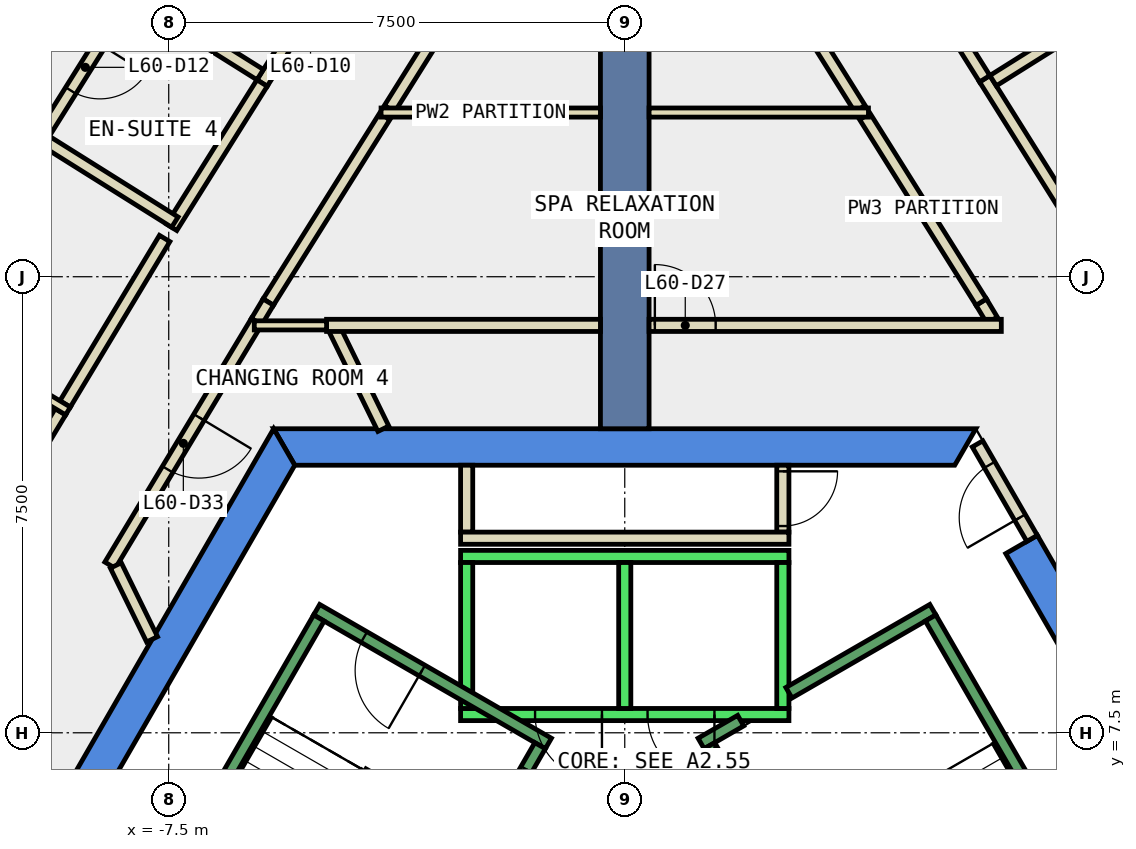
"""IFC4 building model, lengths in metres.
Left out: names, types, materials, properties, quantities, classifications, styles, units other than length and angle.
Written with IfcOpenShell. Run it as: python <this file> out.ifc"""

import sys

from ifc_helpers import new_model, si_unit, direction, frame, frame_2d, origin, place, context, subcontext, project, spatial, polyline, rectangle, outline, extrude, element, fill, save


model = new_model("IFC4")
c1 = context("Model", 3, precision=1e-05, world=origin(), true_north=direction((0.0, 1.0)))
c2 = subcontext(c1, "Body", "Model", "MODEL_VIEW")
j1 = project(units=[si_unit("LENGTHUNIT", "METRE"), si_unit("PLANEANGLEUNIT", "RADIAN")], contexts=[c1])
p1 = place(None, origin())
s1 = spatial("IfcSite", under=j1, at=p1, CompositionType="ELEMENT")
p2 = place(p1, origin())
s2 = spatial("IfcBuilding", under=s1, at=p2, CompositionType="ELEMENT")
p3 = place(p2, frame((0.0, 0.0, 263.0)))
s3 = spatial("IfcBuildingStorey", under=s2, at=p3, CompositionType="ELEMENT", Elevation=263.0)
p4 = place(p3, frame((0.0, 0.0, -0.34)))
e1 = element("IfcWall", 1, at=p4, inside=s3, PredefinedType="SHEAR", context=c2, shape_type="SweptSolid", body=[
    extrude(outline(polyline([(6.786, 10.747), (6.266, 10.447), (10.854, 2.5), (11.547, 2.5), (6.786, 10.747)])), origin(), (0.0, 0.0, 1.0), 3.6),
])
p5 = place(p3, frame((0.0, 0.0, -0.34)))
e2 = element("IfcWall", 2, at=p5, inside=s3, PredefinedType="SHEAR", context=c2, shape_type="SweptSolid", body=[
    extrude(outline(polyline([(5.774, 12.5), (-5.774, 12.5), (-5.427, 11.9), (5.427, 11.9), (5.774, 12.5)])), origin(), (0.0, 0.0, 1.0), 3.6),
])
p6 = place(p3, frame((0.0, 0.0, -0.34)))
e3 = element("IfcWall", 3, at=p6, inside=s3, PredefinedType="SHEAR", context=c2, shape_type="SweptSolid", body=[
    extrude(outline(polyline([(-10.535, 4.253), (-10.015, 3.953), (-5.427, 11.9), (-5.774, 12.5), (-10.535, 4.253)])), origin(), (0.0, 0.0, 1.0), 3.6),
])
p7 = place(p3, frame((0.0, 12.5, -0.34), z_axis=(0.0, 0.0, 1.0), x_axis=(0.0, 1.0, 0.0)))
e4 = element("IfcWall", 4, at=p7, inside=s3, PredefinedType="SHEAR", context=c2, shape_type="SweptSolid", body=[
    extrude(rectangle(XDim=9.0, YDim=0.8, at=frame_2d((4.5, 0.0))), origin(), (0.0, 0.0, 1.0), 3.6),
])
p8 = place(p3, frame((-3.97, 12.5, 0.0), z_axis=(0.0, 0.0, 1.0), x_axis=(-0.440355460167, 0.89782351757, 0.0)))
e5 = element("IfcWall", 5, at=p8, inside=s3, PredefinedType="PARTITIONING", context=c2, shape_type="SweptSolid", body=[
    extrude(rectangle(XDim=1.869, YDim=0.2, at=frame_2d((0.935, 0.0))), origin(), (0.0, 0.0, 1.0), 3.26),
])
p9 = place(p3, frame((-6.054, 14.264, 0.0), z_axis=(0.0, 0.0, 1.0), x_axis=(-0.515508653897, -0.856884372455, 0.0)))
e6 = element("IfcWall", 6, at=p9, inside=s3, PredefinedType="PARTITIONING", context=c2, shape_type="SweptSolid", body=[
    extrude(rectangle(XDim=4.677, YDim=0.2, at=frame_2d((2.339, 0.0))), origin(), (0.0, 0.0, 1.0), 3.26),
])
p10 = place(p9, frame((1.839, 0.0, 0.0)))
e7 = element("IfcOpeningElement", 7, at=p10, cuts=e6, PredefinedType="OPENING", context=c2, shape_type="SweptSolid", body=[
    extrude(rectangle(XDim=1.0, YDim=2.1, at=frame_2d((0.5, 1.05))), frame((0.0, 0.11, 0.0), z_axis=(0.0, -1.0, 0.0), x_axis=(1.0, 0.0, 0.0)), (0.0, 0.0, 1.0), 0.22),
])
p11 = place(p3, frame((-8.37, 10.252, 0.0), z_axis=(0.0, 0.0, 1.0), x_axis=(0.440562172885, -0.897722101668, 0.0)))
e8 = element("IfcWall", 8, at=p11, inside=s3, PredefinedType="PARTITIONING", context=c2, shape_type="SweptSolid", body=[
    extrude(rectangle(XDim=1.353, YDim=0.2, at=frame_2d((0.677, 0.0))), origin(), (0.0, 0.0, 1.0), 3.26),
])
p12 = place(p3, frame((-4.904, 14.2, 0.0), z_axis=(0.0, 0.0, 1.0), x_axis=(1.0, 0.0, 0.0)))
e9 = element("IfcWall", 9, at=p12, inside=s3, PredefinedType="PARTITIONING", context=c2, shape_type="SweptSolid", body=[
    extrude(rectangle(XDim=4.504, YDim=0.2, at=frame_2d((2.252, 0.0))), origin(), (0.0, 0.0, 1.0), 3.26),
])
p13 = place(p3, frame((6.041, 14.286, 0.0), z_axis=(0.0, 0.0, 1.0), x_axis=(-0.513873647624, 0.857865883619, 0.0)))
e10 = element("IfcWall", 10, at=p13, inside=s3, PredefinedType="PARTITIONING", context=c2, shape_type="SweptSolid", body=[
    extrude(rectangle(XDim=0.346, YDim=0.2, at=frame_2d((0.173, 0.0))), origin(), (0.0, 0.0, 1.0), 3.26),
])
for number, where, z_axis, x_axis in (
    (11, (5.863, 14.583, 0.0), (0.0, 0.0, 1.0), (-0.531, 0.847, 0.0)),
    (12, (-3.948, 17.636, 0.0), (0.0, 0.0, 1.0), (-0.531, -0.847, 0.0)),
):
    element("IfcWall", number, at=place(p3, frame(where, z_axis=z_axis, x_axis=x_axis)), inside=s3, PredefinedType="PARTITIONING", context=c2, shape_type="SweptSolid", body=[
        extrude(rectangle(XDim=3.604, YDim=0.2, at=frame_2d((1.802, 0.0))), origin(), (0.0, 0.0, 1.0), 3.26),
    ])
p14 = place(p3, frame((-5.863, 14.583, 0.0), z_axis=(0.0, 0.0, 1.0), x_axis=(-0.513433271491, -0.858129521533, 0.0)))
e13 = element("IfcWall", 13, at=p14, inside=s3, PredefinedType="PARTITIONING", context=c2, shape_type="SweptSolid", body=[
    extrude(rectangle(XDim=0.372, YDim=0.2, at=frame_2d((0.186, 0.0))), origin(), (0.0, 0.0, 1.0), 3.26),
])
for number, where, z_axis, x_axis in (
    (14, (3.868, 17.764, 0.0), (0.0, 0.0, 1.0), (-0.531, 0.847, 0.0)),
    (15, (-2.773, 19.511, 0.0), (0.0, 0.0, 1.0), (-0.531, -0.847, 0.0)),
):
    element("IfcWall", number, at=place(p3, frame(where, z_axis=z_axis, x_axis=x_axis)), inside=s3, PredefinedType="PARTITIONING", context=c2, shape_type="SweptSolid", body=[
        extrude(rectangle(XDim=2.062, YDim=0.2, at=frame_2d((1.031, 0.0))), origin(), (0.0, 0.0, 1.0), 3.26),
    ])
p15 = place(p3, frame((5.92, 18.256, 0.0), z_axis=(0.0, 0.0, 1.0), x_axis=(0.531152062518, -0.84727651123, 0.0)))
e16 = element("IfcWall", 16, at=p15, inside=s3, PredefinedType="PARTITIONING", context=c2, shape_type="SweptSolid", body=[
    extrude(rectangle(XDim=3.101, YDim=0.2, at=frame_2d((1.55, 0.0))), origin(), (0.0, 0.0, 1.0), 3.26),
])
p16 = place(p3, frame((4.433, 20.628, 0.0), z_axis=(0.0, 0.0, 1.0), x_axis=(0.531135189756, -0.84728708842, 0.0)))
e17 = element("IfcWall", 17, at=p16, inside=s3, PredefinedType="PARTITIONING", context=c2, shape_type="SweptSolid", body=[
    extrude(rectangle(XDim=2.799, YDim=0.2, at=frame_2d((1.4, 0.0))), origin(), (0.0, 0.0, 1.0), 3.26),
])
p17 = place(p3, frame((-5.965, 18.185, 0.0), z_axis=(0.0, 0.0, 1.0), x_axis=(0.531256372055, 0.847211111324, 0.0)))
e18 = element("IfcWall", 18, at=p17, inside=s3, PredefinedType="PARTITIONING", context=c2, shape_type="SweptSolid", body=[
    extrude(rectangle(XDim=3.0, YDim=0.2, at=frame_2d((1.5, 0.0))), origin(), (0.0, 0.0, 1.0), 3.26),
])
p18 = place(p17, frame((1.0, 0.0, 0.0)))
e19 = element("IfcOpeningElement", 19, at=p18, cuts=e18, PredefinedType="OPENING", context=c2, shape_type="SweptSolid", body=[
    extrude(rectangle(XDim=1.0, YDim=2.1, at=frame_2d((0.5, 1.05))), frame((0.0, 0.11, 0.0), z_axis=(0.0, -1.0, 0.0), x_axis=(1.0, 0.0, 0.0)), (0.0, 0.0, 1.0), 0.22),
])
p19 = place(p3, frame((-9.204, 12.908, 0.0), z_axis=(0.0, 0.0, 1.0), x_axis=(0.51556943596, 0.856847802532, 0.0)))
e20 = element("IfcWall", 20, at=p19, inside=s3, PredefinedType="PARTITIONING", context=c2, shape_type="SweptSolid", body=[
    extrude(rectangle(XDim=3.176, YDim=0.2, at=frame_2d((1.588, 0.0))), origin(), (0.0, 0.0, 1.0), 3.26),
])
p20 = place(p3, frame((-7.452, 15.813, 0.0), z_axis=(0.0, 0.0, 1.0), x_axis=(0.531095943551, 0.847311689252, 0.0)))
e21 = element("IfcWall", 21, at=p20, inside=s3, PredefinedType="PARTITIONING", context=c2, shape_type="SweptSolid", body=[
    extrude(rectangle(XDim=2.8, YDim=0.2, at=frame_2d((1.4, 0.0))), origin(), (0.0, 0.0, 1.0), 3.26),
])
p21 = place(p3, frame((-10.919, 10.057, 0.0), z_axis=(0.0, 0.0, 1.0), x_axis=(0.515568955032, 0.856848091908, 0.0)))
e22 = element("IfcWall", 22, at=p21, inside=s3, PredefinedType="PARTITIONING", context=c2, shape_type="SweptSolid", body=[
    extrude(rectangle(XDim=3.177, YDim=0.2, at=frame_2d((1.588, 0.0))), origin(), (0.0, 0.0, 1.0), 3.26),
])
p22 = place(p21, frame((1.088, 0.0, 0.0)))
e23 = element("IfcOpeningElement", 23, at=p22, cuts=e22, PredefinedType="OPENING", context=c2, shape_type="SweptSolid", body=[
    extrude(rectangle(XDim=1.0, YDim=2.1, at=frame_2d((0.5, 1.05))), frame((0.0, 0.11, 0.0), z_axis=(0.0, -1.0, 0.0), x_axis=(1.0, 0.0, 0.0)), (0.0, 0.0, 1.0), 0.22),
])
p23 = place(p3, frame((-2.6, 10.8, 0.0), z_axis=(0.0, 0.0, 1.0), x_axis=(0.0, 1.0, 0.0)))
e24 = element("IfcWall", 24, at=p23, inside=s3, PredefinedType="PARTITIONING", context=c2, shape_type="SweptSolid", body=[
    extrude(rectangle(XDim=1.1, YDim=0.2, at=frame_2d((0.55, 0.0))), origin(), (0.0, 0.0, 1.0), 3.26),
])
p24 = place(p3, frame((2.6, 11.9, 0.0), z_axis=(0.0, 0.0, 1.0), x_axis=(0.0, -1.0, 0.0)))
e25 = element("IfcWall", 25, at=p24, inside=s3, PredefinedType="PARTITIONING", context=c2, shape_type="SweptSolid", body=[
    extrude(rectangle(XDim=1.1, YDim=0.2, at=frame_2d((0.55, 0.0))), origin(), (0.0, 0.0, 1.0), 3.26),
])
p25 = place(p24, frame((0.1, 0.0, 0.0)))
e26 = element("IfcOpeningElement", 26, at=p25, cuts=e25, PredefinedType="OPENING", context=c2, shape_type="SweptSolid", body=[
    extrude(rectangle(XDim=0.9, YDim=2.1, at=frame_2d((0.45, 1.05))), frame((0.0, 0.11, 0.0), z_axis=(0.0, -1.0, 0.0), x_axis=(1.0, 0.0, 0.0)), (0.0, 0.0, 1.0), 0.22),
])
p26 = place(p3, frame((2.7, 10.7, 0.0), z_axis=(0.0, 0.0, 1.0), x_axis=(-1.0, 0.0, 0.0)))
e27 = element("IfcWall", 27, at=p26, inside=s3, PredefinedType="PARTITIONING", context=c2, shape_type="SweptSolid", body=[
    extrude(rectangle(XDim=5.4, YDim=0.2, at=frame_2d((2.7, 0.0))), origin(), (0.0, 0.0, 1.0), 3.26),
])
p27 = place(p3, frame((-4.904, 14.2, 0.0), z_axis=(0.0, 0.0, 1.0), x_axis=(-1.0, 0.0, 0.0)))
e28 = element("IfcWall", 28, at=p27, inside=s3, PredefinedType="PARTITIONING", context=c2, shape_type="SweptSolid", body=[
    extrude(rectangle(XDim=1.189, YDim=0.15, at=frame_2d((0.594, 0.0))), origin(), (0.0, 0.0, 1.0), 3.26),
])
p28 = place(p3, frame((-4.008, 17.7, 0.0), z_axis=(0.0, 0.0, 1.0), x_axis=(1.0, 0.0, 0.0)))
e29 = element("IfcWall", 29, at=p28, inside=s3, PredefinedType="PARTITIONING", context=c2, shape_type="SweptSolid", body=[
    extrude(rectangle(XDim=3.608, YDim=0.15, at=frame_2d((1.804, 0.0))), origin(), (0.0, 0.0, 1.0), 3.26),
])
for number, where, z_axis, x_axis in (
    (30, (6.058, 18.224, 0.0), (0.0, 0.0, 1.0), (0.847, 0.531, 0.0)),
    (31, (-5.996, 18.323, 0.0), (0.0, 0.0, 1.0), (-0.847, 0.531, 0.0)),
):
    element("IfcWall", number, at=place(p3, frame(where, z_axis=z_axis, x_axis=x_axis)), inside=s3, PredefinedType="PARTITIONING", context=c2, shape_type="SweptSolid", body=[
        extrude(rectangle(XDim=2.4, YDim=0.2, at=frame_2d((1.2, 0.0))), origin(), (0.0, 0.0, 1.0), 3.26),
    ])
p29 = place(p3, frame((-8.088, 19.693, 0.0), z_axis=(0.0, 0.0, 1.0), x_axis=(-0.531277961984, -0.847197572654, 0.0)))
e32 = element("IfcWall", 32, at=p29, inside=s3, PredefinedType="PARTITIONING", context=c2, shape_type="SweptSolid", body=[
    extrude(rectangle(XDim=2.95, YDim=0.2, at=frame_2d((1.475, 0.0))), origin(), (0.0, 0.0, 1.0), 3.26),
])
p30 = place(p29, frame((1.025, 0.0, 0.0)))
e33 = element("IfcOpeningElement", 33, at=p30, cuts=e32, PredefinedType="OPENING", context=c2, shape_type="SweptSolid", body=[
    extrude(rectangle(XDim=0.9, YDim=2.1, at=frame_2d((0.45, 1.05))), frame((0.0, 0.11, 0.0), z_axis=(0.0, -1.0, 0.0), x_axis=(1.0, 0.0, 0.0)), (0.0, 0.0, 1.0), 0.22),
])
p31 = place(p3, frame((-9.517, 17.226, 0.0), z_axis=(0.0, 0.0, 1.0), x_axis=(0.847229363594, -0.53122726348, 0.0)))
e34 = element("IfcWall", 34, at=p31, inside=s3, PredefinedType="PARTITIONING", context=c2, shape_type="SweptSolid", body=[
    extrude(rectangle(XDim=2.5, YDim=0.2, at=frame_2d((1.25, 0.0))), origin(), (0.0, 0.0, 1.0), 3.26),
])
p32 = place(p3, frame((-9.157, 12.792, 0.0), z_axis=(0.0, 0.0, 1.0), x_axis=(-0.856933793276, 0.515426497129, 0.0)))
e35 = element("IfcWall", 35, at=p32, inside=s3, PredefinedType="PARTITIONING", context=c2, shape_type="SweptSolid", body=[
    extrude(rectangle(XDim=5.9, YDim=0.15, at=frame_2d((2.95, 0.0))), origin(), (0.0, 0.0, 1.0), 3.26),
])
p33 = place(p3, frame((6.699, 10.697, 0.0), z_axis=(0.0, 0.0, 1.0), x_axis=(-0.499914839587, 0.866074565589, 0.0)))
e36 = element("IfcWall", 36, at=p33, inside=s3, PredefinedType="PARTITIONING", context=c2, shape_type="SweptSolid", body=[
    extrude(rectangle(XDim=1.794, YDim=0.2, at=frame_2d((0.897, 0.0))), origin(), (0.0, 0.0, 1.0), 2.4),
])
p34 = place(p33, frame((0.397, 0.0, 0.0)))
e37 = element("IfcOpeningElement", 37, at=p34, cuts=e36, PredefinedType="OPENING", context=c2, shape_type="SweptSolid", body=[
    extrude(rectangle(XDim=1.0, YDim=2.1, at=frame_2d((0.5, 1.05))), frame((0.0, 0.11, 0.0), z_axis=(0.0, -1.0, 0.0), x_axis=(1.0, 0.0, 0.0)), (0.0, 0.0, 1.0), 0.22),
])
p35 = place(p3, frame((0.4, 14.2, 0.0), z_axis=(0.0, 0.0, 1.0), x_axis=(1.0, 0.0, 0.0)))
e38 = element("IfcWall", 38, at=p35, inside=s3, PredefinedType="PARTITIONING", context=c2, shape_type="SweptSolid", body=[
    extrude(rectangle(XDim=5.793, YDim=0.2, at=frame_2d((2.896, 0.0))), origin(), (0.0, 0.0, 1.0), 3.26),
])
p36 = place(p35, frame((0.095, 0.0, 0.0)))
e39 = element("IfcOpeningElement", 39, at=p36, cuts=e38, PredefinedType="OPENING", context=c2, shape_type="SweptSolid", body=[
    extrude(rectangle(XDim=1.0, YDim=2.1, at=frame_2d((0.5, 1.05))), frame((0.0, 0.11, 0.0), z_axis=(0.0, -1.0, 0.0), x_axis=(1.0, 0.0, 0.0)), (0.0, 0.0, 1.0), 0.22),
])
p37 = place(p3, frame((0.4, 17.7, 0.0), z_axis=(0.0, 0.0, 1.0), x_axis=(1.0, 0.0, 0.0)))
e40 = element("IfcWall", 40, at=p37, inside=s3, PredefinedType="PARTITIONING", context=c2, shape_type="SweptSolid", body=[
    extrude(rectangle(XDim=3.608, YDim=0.15, at=frame_2d((1.804, 0.0))), origin(), (0.0, 0.0, 1.0), 3.26),
])
p38 = place(p3, frame((2.7, 7.8, 0.0), z_axis=(0.0, 0.0, 1.0), x_axis=(-1.0, 0.0, 0.0)))
e41 = element("IfcWall", 41, at=p38, inside=s3, PredefinedType="STANDARD", context=c2, shape_type="SweptSolid", body=[
    extrude(rectangle(XDim=5.4, YDim=0.2, at=frame_2d((2.7, 0.0))), origin(), (0.0, 0.0, 1.0), 3.26),
])
p39 = place(p38, frame((1.225, 0.0, 0.0)))
e42 = element("IfcOpeningElement", 42, at=p39, cuts=e41, PredefinedType="OPENING", context=c2, shape_type="SweptSolid", body=[
    extrude(rectangle(XDim=1.1, YDim=2.1, at=frame_2d((0.55, 1.05))), frame((0.0, 0.11, 0.0), z_axis=(0.0, -1.0, 0.0), x_axis=(1.0, 0.0, 0.0)), (0.0, 0.0, 1.0), 0.22),
])
p40 = place(p38, frame((3.075, 0.0, 0.0)))
e43 = element("IfcOpeningElement", 43, at=p40, cuts=e41, PredefinedType="OPENING", context=c2, shape_type="SweptSolid", body=[
    extrude(rectangle(XDim=1.1, YDim=2.1, at=frame_2d((0.55, 1.05))), frame((0.0, 0.11, 0.0), z_axis=(0.0, -1.0, 0.0), x_axis=(1.0, 0.0, 0.0)), (0.0, 0.0, 1.0), 0.22),
])
p41 = place(p3, frame((2.7, 10.4, 0.0), z_axis=(0.0, 0.0, 1.0), x_axis=(-1.0, 0.0, 0.0)))
e44 = element("IfcWall", 44, at=p41, inside=s3, PredefinedType="STANDARD", context=c2, shape_type="SweptSolid", body=[
    extrude(rectangle(XDim=5.4, YDim=0.2, at=frame_2d((2.7, 0.0))), origin(), (0.0, 0.0, 1.0), 3.26),
])
for number, where, z_axis, x_axis in (
    (45, (2.6, 7.9, 0.0), (0.0, 0.0, 1.0), (0.0, 1.0, 0.0)),
    (46, (0.0, 7.9, 0.0), (0.0, 0.0, 1.0), (0.0, 1.0, 0.0)),
    (47, (-2.6, 7.9, 0.0), (0.0, 0.0, 1.0), (0.0, 1.0, 0.0)),
):
    element("IfcWall", number, at=place(p3, frame(where, z_axis=z_axis, x_axis=x_axis)), inside=s3, PredefinedType="STANDARD", context=c2, shape_type="SweptSolid", body=[
        extrude(rectangle(XDim=2.4, YDim=0.2, at=frame_2d((1.2, 0.0))), origin(), (0.0, 0.0, 1.0), 3.26),
    ])
p42 = place(p3, frame((2.7, 8.158, 0.0), z_axis=(0.0, 0.0, 1.0), x_axis=(0.86611865017, 0.499838457731, 0.0)))
e48 = element("IfcWall", 48, at=p42, inside=s3, PredefinedType="STANDARD", context=c2, shape_type="SweptSolid", body=[
    extrude(rectangle(XDim=2.733, YDim=0.2, at=frame_2d((1.366, 0.0))), origin(), (0.0, 0.0, 1.0), 3.26),
])
p43 = place(p3, frame((1.256, 7.324, 0.0), z_axis=(0.0, 0.0, 1.0), x_axis=(0.865915093549, 0.500191014278, 0.0)))
e49 = element("IfcWall", 49, at=p43, inside=s3, PredefinedType="STANDARD", context=c2, shape_type="SweptSolid", body=[
    extrude(rectangle(XDim=0.752, YDim=0.2, at=frame_2d((0.376, 0.0))), origin(), (0.0, 0.0, 1.0), 3.26),
])
p44 = place(p3, frame((4.843, 1.312, 0.0), z_axis=(0.0, 0.0, 1.0), x_axis=(-0.499963383562, 0.866046543262, 0.0)))
e50 = element("IfcWall", 50, at=p44, inside=s3, PredefinedType="STANDARD", context=c2, shape_type="SweptSolid", body=[
    extrude(rectangle(XDim=6.9, YDim=0.2, at=frame_2d((3.45, 0.0))), origin(), (0.0, 0.0, 1.0), 3.26),
])
p45 = place(p44, frame((0.45, 0.0, 0.0)))
e51 = element("IfcOpeningElement", 51, at=p45, cuts=e50, PredefinedType="OPENING", context=c2, shape_type="SweptSolid", body=[
    extrude(rectangle(XDim=1.1, YDim=2.2, at=frame_2d((0.55, 1.1))), frame((0.0, 0.11, 0.0), z_axis=(0.0, -1.0, 0.0), x_axis=(1.0, 0.0, 0.0)), (0.0, 0.0, 1.0), 0.22),
])
p46 = place(p3, frame((8.48, 3.412, 0.0), z_axis=(0.0, 0.0, 1.0), x_axis=(-0.499978703459, 0.866037698999, 0.0)))
e52 = element("IfcWall", 52, at=p46, inside=s3, PredefinedType="STANDARD", context=c2, shape_type="SweptSolid", body=[
    extrude(rectangle(XDim=6.9, YDim=0.2, at=frame_2d((3.45, 0.0))), origin(), (0.0, 0.0, 1.0), 3.26),
])
p47 = place(p3, frame((-1.256, 7.324, 0.0), z_axis=(0.0, 0.0, 1.0), x_axis=(-0.866046073146, 0.499964197906, 0.0)))
e53 = element("IfcWall", 53, at=p47, inside=s3, PredefinedType="STANDARD", context=c2, shape_type="SweptSolid", body=[
    extrude(rectangle(XDim=4.4, YDim=0.2, at=frame_2d((2.2, 0.0))), origin(), (0.0, 0.0, 1.0), 3.26),
])
p48 = place(p47, frame((2.4, 0.0, 0.0)))
e54 = element("IfcOpeningElement", 54, at=p48, cuts=e53, PredefinedType="OPENING", context=c2, shape_type="SweptSolid", body=[
    extrude(rectangle(XDim=1.1, YDim=2.2, at=frame_2d((0.55, 1.1))), frame((0.0, 0.11, 0.0), z_axis=(0.0, -1.0, 0.0), x_axis=(1.0, 0.0, 0.0)), (0.0, 0.0, 1.0), 0.22),
])
p49 = place(p3, frame((-1.393, 7.288, 0.0), z_axis=(0.0, 0.0, 1.0), x_axis=(-0.499963383562, -0.866046543262, 0.0)))
e55 = element("IfcWall", 55, at=p49, inside=s3, PredefinedType="STANDARD", context=c2, shape_type="SweptSolid", body=[
    extrude(rectangle(XDim=6.9, YDim=0.2, at=frame_2d((3.45, 0.0))), origin(), (0.0, 0.0, 1.0), 3.26),
])
p50 = place(p49, frame((0.45, 0.0, 0.0)))
e56 = element("IfcOpeningElement", 56, at=p50, cuts=e55, PredefinedType="OPENING", context=c2, shape_type="SweptSolid", body=[
    extrude(rectangle(XDim=1.1, YDim=2.2, at=frame_2d((0.55, 1.1))), frame((0.0, 0.11, 0.0), z_axis=(0.0, -1.0, 0.0), x_axis=(1.0, 0.0, 0.0)), (0.0, 0.0, 1.0), 0.22),
])
p51 = place(p3, frame((-5.03, 9.388, 0.0), z_axis=(0.0, 0.0, 1.0), x_axis=(-0.499978703459, -0.866037698999, 0.0)))
e57 = element("IfcWall", 57, at=p51, inside=s3, PredefinedType="STANDARD", context=c2, shape_type="SweptSolid", body=[
    extrude(rectangle(XDim=6.9, YDim=0.2, at=frame_2d((3.45, 0.0))), origin(), (0.0, 0.0, 1.0), 3.26),
])
p52 = place(p30, origin())
e58 = element("IfcDoor", 58, at=p52, inside=s3, OperationType="SINGLE_SWING_LEFT", PredefinedType="DOOR", context=c2, shape_type="SweptSolid", body=[
    extrude(rectangle(XDim=0.9, YDim=2.1, at=frame_2d((0.45, 1.05))), frame((0.0, 0.025, 0.0), z_axis=(0.0, -1.0, 0.0), x_axis=(1.0, 0.0, 0.0)), (0.0, 0.0, 1.0), 0.05),
])
fill(e33, e58)
p53 = place(p36, origin())
e59 = element("IfcDoor", 59, at=p53, inside=s3, OperationType="SINGLE_SWING_LEFT", PredefinedType="DOOR", context=c2, shape_type="SweptSolid", body=[
    extrude(rectangle(XDim=1.0, YDim=2.1, at=frame_2d((0.5, 1.05))), frame((0.0, 0.025, 0.0), z_axis=(0.0, -1.0, 0.0), x_axis=(1.0, 0.0, 0.0)), (0.0, 0.0, 1.0), 0.05),
])
fill(e39, e59)
p54 = place(p10, origin())
e60 = element("IfcDoor", 60, at=p54, inside=s3, OperationType="SINGLE_SWING_LEFT", PredefinedType="DOOR", context=c2, shape_type="SweptSolid", body=[
    extrude(rectangle(XDim=1.0, YDim=2.1, at=frame_2d((0.5, 1.05))), frame((0.0, 0.025, 0.0), z_axis=(0.0, -1.0, 0.0), x_axis=(1.0, 0.0, 0.0)), (0.0, 0.0, 1.0), 0.05),
])
fill(e7, e60)
p55 = place(p25, origin())
e61 = element("IfcDoor", 61, at=p55, inside=s3, OperationType="SINGLE_SWING_LEFT", PredefinedType="DOOR", context=c2, shape_type="SweptSolid", body=[
    extrude(rectangle(XDim=0.9, YDim=2.1, at=frame_2d((0.45, 1.05))), frame((0.0, 0.025, 0.0), z_axis=(0.0, -1.0, 0.0), x_axis=(1.0, 0.0, 0.0)), (0.0, 0.0, 1.0), 0.05),
])
fill(e26, e61)
p56 = place(p34, origin())
e62 = element("IfcDoor", 62, at=p56, inside=s3, OperationType="SINGLE_SWING_LEFT", PredefinedType="DOOR", context=c2, shape_type="SweptSolid", body=[
    extrude(rectangle(XDim=1.0, YDim=2.1, at=frame_2d((0.5, 1.05))), frame((0.0, 0.025, 0.0), z_axis=(0.0, -1.0, 0.0), x_axis=(1.0, 0.0, 0.0)), (0.0, 0.0, 1.0), 0.05),
])
fill(e37, e62)
p57 = place(p39, origin())
e63 = element("IfcDoor", 63, at=p57, inside=s3, OperationType="SLIDING_TO_LEFT", PredefinedType="DOOR", context=c2, shape_type="SweptSolid", body=[
    extrude(rectangle(XDim=1.1, YDim=2.1, at=frame_2d((0.55, 1.05))), frame((0.0, 0.025, 0.0), z_axis=(0.0, -1.0, 0.0), x_axis=(1.0, 0.0, 0.0)), (0.0, 0.0, 1.0), 0.05),
])
fill(e42, e63)
p58 = place(p40, origin())
e64 = element("IfcDoor", 64, at=p58, inside=s3, OperationType="SLIDING_TO_LEFT", PredefinedType="DOOR", context=c2, shape_type="SweptSolid", body=[
    extrude(rectangle(XDim=1.1, YDim=2.1, at=frame_2d((0.55, 1.05))), frame((0.0, 0.025, 0.0), z_axis=(0.0, -1.0, 0.0), x_axis=(1.0, 0.0, 0.0)), (0.0, 0.0, 1.0), 0.05),
])
fill(e43, e64)
p59 = place(p50, origin())
e65 = element("IfcDoor", 65, at=p59, inside=s3, OperationType="SINGLE_SWING_LEFT", PredefinedType="DOOR", context=c2, shape_type="SweptSolid", body=[
    extrude(rectangle(XDim=1.1, YDim=2.2, at=frame_2d((0.55, 1.1))), frame((0.0, 0.025, 0.0), z_axis=(0.0, -1.0, 0.0), x_axis=(1.0, 0.0, 0.0)), (0.0, 0.0, 1.0), 0.05),
])
fill(e56, e65)
p60 = place(p48, origin())
e66 = element("IfcDoor", 66, at=p60, inside=s3, OperationType="SINGLE_SWING_LEFT", PredefinedType="DOOR", context=c2, shape_type="SweptSolid", body=[
    extrude(rectangle(XDim=1.1, YDim=2.2, at=frame_2d((0.55, 1.1))), frame((0.0, 0.025, 0.0), z_axis=(0.0, -1.0, 0.0), x_axis=(1.0, 0.0, 0.0)), (0.0, 0.0, 1.0), 0.05),
])
fill(e54, e66)
save(model, sys.argv[1])
